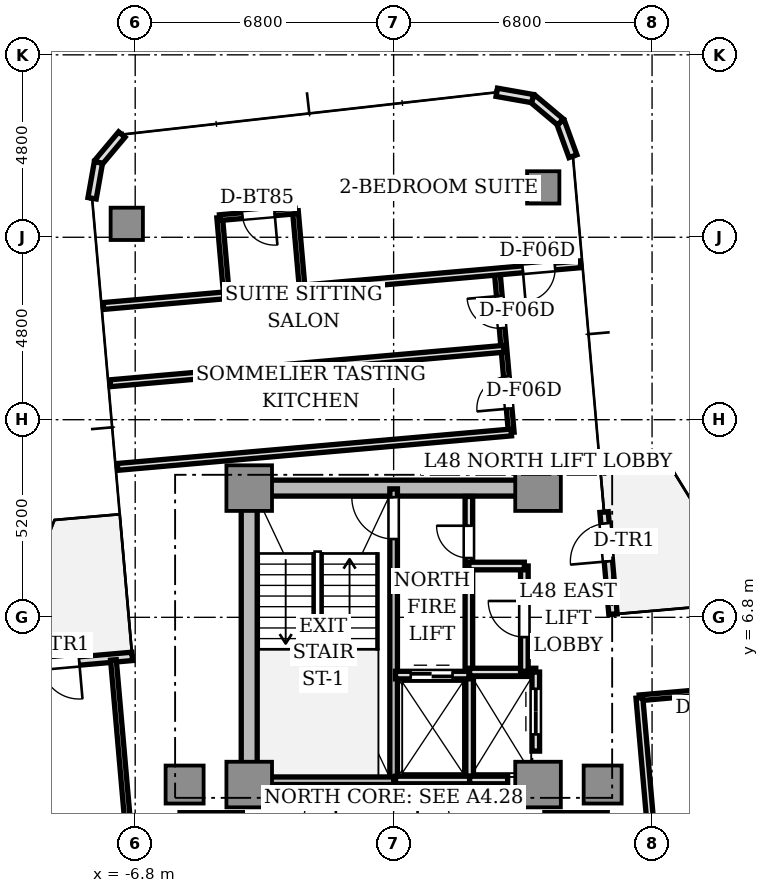
"""IFC4 building model, lengths in metres.
Left out: names, types, materials, properties, quantities, classifications, styles, units other than length and angle.
Written with IfcOpenShell. Run it as: python <this file> out.ifc"""

import sys

from ifc_helpers import new_model, si_unit, direction, frame, frame_2d, origin, origin_2d, place, context, subcontext, project, spatial, rectangle, extrude, source, transform, mapped, element, fill, save


model = new_model("IFC4")
c1 = context("Model", 3, precision=1e-05, world=origin(), true_north=direction((0.0, 1.0)))
c2 = subcontext(c1, "Body", "Model", "MODEL_VIEW")
j1 = project(units=[si_unit("LENGTHUNIT", "METRE"), si_unit("PLANEANGLEUNIT", "RADIAN")], contexts=[c1])
p1 = place(None, origin())
s1 = spatial("IfcSite", under=j1, at=p1, CompositionType="ELEMENT")
p2 = place(p1, origin())
s2 = spatial("IfcBuilding", under=s1, at=p2, CompositionType="ELEMENT")
p3 = place(p2, frame((0.0, 0.0, 175.2)))
s3 = spatial("IfcBuildingStorey", under=s2, at=p3, CompositionType="ELEMENT", Elevation=175.2)
p4 = place(p3, frame((-3.55, 10.2, 0.0), z_axis=(0.0, 0.0, 1.0), x_axis=(1.0, 0.0, 0.0)))
e1 = element("IfcWall", 1, at=p4, inside=s3, PredefinedType="SHEAR", context=c2, shape_type="SweptSolid", body=[
    extrude(rectangle(XDim=7.1, YDim=0.42, at=frame_2d((3.55, 0.0))), origin(), (0.0, 0.0, 1.0), 3.11),
])
p5 = place(p3, frame((-3.8, 2.85, 0.0), z_axis=(0.0, 0.0, 1.0), x_axis=(0.0, 1.0, 0.0)))
e2 = element("IfcWall", 2, at=p5, inside=s3, PredefinedType="SHEAR", context=c2, shape_type="SweptSolid", body=[
    extrude(rectangle(XDim=6.9, YDim=0.42, at=frame_2d((3.45, 0.0))), origin(), (0.0, 0.0, 1.0), 3.11),
])
m1 = source(origin(), c2, "Body", "SweptSolid", [
    extrude(rectangle(XDim=1.2, YDim=1.2, at=origin_2d()), origin(), (0.0, 0.0, 1.0), 3.11),
])
for number, where, z_axis, x_axis in (
    (3, (-3.8, 2.4, 0.0), (0.0, 0.0, 1.0), (1.0, 0.0, 0.0)),
    (4, (3.8, 2.4, 0.0), (0.0, 0.0, 1.0), (1.0, 0.0, 0.0)),
    (5, (-3.8, 10.2, 0.0), (0.0, 0.0, 1.0), (1.0, 0.0, 0.0)),
    (6, (3.8, 10.2, 0.0), (0.0, 0.0, 1.0), (1.0, 0.0, 0.0)),
):
    element("IfcColumn", number, at=place(p3, frame(where, z_axis=z_axis, x_axis=x_axis)), inside=s3, PredefinedType="COLUMN", context=c2, shape_type="MappedRepresentation", body=[
        mapped(m1, transform((0.0, 0.0, 0.0), scale=1.0)),
    ])
m2 = source(origin(), c2, "Body", "SweptSolid", [
    extrude(rectangle(XDim=1.0, YDim=1.0, at=origin_2d()), origin(), (0.0, 0.0, 1.0), 3.11),
])
for number, where, z_axis, x_axis in (
    (7, (5.5, 2.4, 0.0), (0.0, 0.0, 1.0), (1.0, 0.0, 0.0)),
    (8, (-5.5, 2.4, 0.0), (0.0, 0.0, 1.0), (1.0, 0.0, 0.0)),
):
    element("IfcColumn", number, at=place(p3, frame(where, z_axis=z_axis, x_axis=x_axis)), inside=s3, PredefinedType="COLUMN", context=c2, shape_type="MappedRepresentation", body=[
        mapped(m2, transform((0.0, 0.0, 0.0), scale=1.0)),
    ])
m3 = source(origin(), c2, "Body", "SweptSolid", [
    extrude(rectangle(XDim=0.85, YDim=0.85, at=origin_2d()), origin(), (0.0, 0.0, 1.0), 3.11),
])
for number, where, z_axis, x_axis in (
    (9, (3.936, 18.112, 0.0), (0.0, 0.0, 1.0), (1.0, 0.0, 0.0)),
    (10, (-7.022, 17.153, 0.0), (0.0, 0.0, 1.0), (1.0, 0.0, 0.0)),
):
    element("IfcColumn", number, at=place(p3, frame(where, z_axis=z_axis, x_axis=x_axis)), inside=s3, PredefinedType="COLUMN", context=c2, shape_type="MappedRepresentation", body=[
        mapped(m3, transform((0.0, 0.0, 0.0), scale=1.0)),
    ])
p6 = place(p3, frame((5.772, 6.879, 0.0), z_axis=(0.0, 0.0, 1.0), x_axis=(-0.087168071984, 0.996193619346, 0.0)))
e11 = element("IfcWall", 11, at=p6, inside=s3, PredefinedType="STANDARD", context=c2, shape_type="SweptSolid", body=[
    extrude(rectangle(XDim=2.7, YDim=0.22, at=frame_2d((1.35, 0.0))), origin(), (0.0, 0.0, 1.0), 3.11),
])
p7 = place(p6, frame((1.4, 0.0, 0.0)))
e12 = element("IfcOpeningElement", 12, at=p7, cuts=e11, PredefinedType="OPENING", context=c2, shape_type="SweptSolid", body=[
    extrude(rectangle(XDim=1.0, YDim=2.2, at=frame_2d((0.5, 1.1))), frame((0.0, 0.12, 0.0), z_axis=(0.0, -1.0, 0.0), x_axis=(1.0, 0.0, 0.0)), (0.0, 0.0, 1.0), 0.24),
])
p8 = place(p3, frame((4.718, 18.933, 0.0), z_axis=(0.0, 0.0, 1.0), x_axis=(-0.34188635151, 0.939741306239, 0.0)))
e13 = element("IfcWall", 13, at=p8, inside=s3, PredefinedType="STANDARD", context=c2, shape_type="SweptSolid", body=[
    extrude(rectangle(XDim=0.958, YDim=0.22, at=frame_2d((0.479, 0.0))), origin(), (0.0, 0.0, 1.0), 3.11),
])
for number, where, z_axis, x_axis in (
    (14, (4.39, 19.833, 0.0), (0.0, 0.0, 1.0), (-0.766, 0.643, 0.0)),
    (15, (3.657, 20.449, 0.0), (0.0, 0.0, 1.0), (-0.985, 0.174, 0.0)),
):
    element("IfcWall", number, at=place(p3, frame(where, z_axis=z_axis, x_axis=x_axis)), inside=s3, PredefinedType="STANDARD", context=c2, shape_type="SweptSolid", body=[
        extrude(rectangle(XDim=0.958, YDim=0.22, at=frame_2d((0.479, 0.0))), origin(), (0.0, 0.0, 1.0), 3.11),
    ])
for number, where, z_axis, x_axis in (
    (16, (-7.152, 19.503, 0.0), (0.0, 0.0, 1.0), (-0.643, -0.766, 0.0)),
    (17, (-7.768, 18.769, 0.0), (0.0, 0.0, 1.0), (-0.174, -0.985, 0.0)),
):
    element("IfcWall", number, at=place(p3, frame(where, z_axis=z_axis, x_axis=x_axis)), inside=s3, PredefinedType="STANDARD", context=c2, shape_type="SweptSolid", body=[
        extrude(rectangle(XDim=0.958, YDim=0.22, at=frame_2d((0.479, 0.0))), origin(), (0.0, 0.0, 1.0), 3.11),
    ])
p9 = place(p3, frame((-6.879, 5.772, 0.0), z_axis=(0.0, 0.0, 1.0), x_axis=(-0.996193619346, -0.087168071984, 0.0)))
e18 = element("IfcWall", 18, at=p9, inside=s3, PredefinedType="STANDARD", context=c2, shape_type="SweptSolid", body=[
    extrude(rectangle(XDim=2.7, YDim=0.22, at=frame_2d((1.35, 0.0))), origin(), (0.0, 0.0, 1.0), 3.11),
])
p10 = place(p9, frame((1.4, 0.0, 0.0)))
e19 = element("IfcOpeningElement", 19, at=p10, cuts=e18, PredefinedType="OPENING", context=c2, shape_type="SweptSolid", body=[
    extrude(rectangle(XDim=1.0, YDim=2.2, at=frame_2d((0.5, 1.1))), frame((0.0, 0.12, 0.0), z_axis=(0.0, -1.0, 0.0), x_axis=(1.0, 0.0, 0.0)), (0.0, 0.0, 1.0), 0.24),
])
p11 = place(p3, frame((0.0, 2.5, 0.0), z_axis=(0.0, 0.0, 1.0), x_axis=(0.0, 1.0, 0.0)))
e20 = element("IfcWall", 20, at=p11, inside=s3, PredefinedType="SOLIDWALL", context=c2, shape_type="SweptSolid", body=[
    extrude(rectangle(XDim=7.68, YDim=0.2, at=frame_2d((3.84, 0.0))), origin(), (0.0, 0.0, 1.0), 3.11),
])
p12 = place(p11, frame((6.36, 0.0, 0.0)))
e21 = element("IfcOpeningElement", 21, at=p12, cuts=e20, PredefinedType="OPENING", context=c2, shape_type="SweptSolid", body=[
    extrude(rectangle(XDim=1.1, YDim=2.15, at=frame_2d((0.55, 1.075))), frame((0.0, 0.11, 0.0), z_axis=(0.0, -1.0, 0.0), x_axis=(1.0, 0.0, 0.0)), (0.0, 0.0, 1.0), 0.22),
])
p13 = place(p3, frame((-3.72, 2.5, 0.0), z_axis=(0.0, 0.0, 1.0), x_axis=(1.0, 0.0, 0.0)))
e22 = element("IfcWall", 22, at=p13, inside=s3, PredefinedType="SOLIDWALL", context=c2, shape_type="SweptSolid", body=[
    extrude(rectangle(XDim=3.72, YDim=0.2, at=frame_2d((1.86, 0.0))), origin(), (0.0, 0.0, 1.0), 3.11),
])
p14 = place(p3, frame((1.98, 5.32, 0.0), z_axis=(0.0, 0.0, 1.0), x_axis=(0.0, 1.0, 0.0)))
e23 = element("IfcWall", 23, at=p14, inside=s3, PredefinedType="SOLIDWALL", context=c2, shape_type="SweptSolid", body=[
    extrude(rectangle(XDim=4.66, YDim=0.2, at=frame_2d((2.33, 0.0))), origin(), (0.0, 0.0, 1.0), 2.66),
])
p15 = place(p14, frame((3.04, 0.0, 0.0)))
e24 = element("IfcOpeningElement", 24, at=p15, cuts=e23, PredefinedType="OPENING", context=c2, shape_type="SweptSolid", body=[
    extrude(rectangle(XDim=0.85, YDim=2.1, at=frame_2d((0.425, 1.05))), frame((0.0, 0.11, 0.0), z_axis=(0.0, -1.0, 0.0), x_axis=(1.0, 0.0, 0.0)), (0.0, 0.0, 1.0), 0.22),
])
p16 = place(p3, frame((2.0, 2.5, 0.0), z_axis=(0.0, 0.0, 1.0), x_axis=(0.0, 1.0, 0.0)))
e25 = element("IfcWall", 25, at=p16, inside=s3, PredefinedType="SOLIDWALL", context=c2, shape_type="SweptSolid", body=[
    extrude(rectangle(XDim=2.78, YDim=0.2, at=frame_2d((1.39, 0.0))), origin(), (0.0, 0.0, 1.0), 2.66),
])
p17 = place(p3, frame((0.05, 2.52, 0.0), z_axis=(0.0, 0.0, 1.0), x_axis=(1.0, 0.0, 0.0)))
e26 = element("IfcWall", 26, at=p17, inside=s3, PredefinedType="SOLIDWALL", context=c2, shape_type="SweptSolid", body=[
    extrude(rectangle(XDim=1.95, YDim=0.2, at=frame_2d((0.975, 0.0))), origin(), (0.0, 0.0, 1.0), 2.66),
])
p18 = place(p3, frame((0.05, 5.28, 0.0), z_axis=(0.0, 0.0, 1.0), x_axis=(1.0, 0.0, 0.0)))
e27 = element("IfcWall", 27, at=p18, inside=s3, PredefinedType="SOLIDWALL", context=c2, shape_type="SweptSolid", body=[
    extrude(rectangle(XDim=1.93, YDim=0.2, at=frame_2d((0.965, 0.0))), origin(), (0.0, 0.0, 1.0), 2.66),
])
p19 = place(p18, frame((0.4, 0.0, 0.0)))
e28 = element("IfcOpeningElement", 28, at=p19, cuts=e27, PredefinedType="OPENING", context=c2, shape_type="SweptSolid", body=[
    extrude(rectangle(XDim=1.1, YDim=2.2, at=frame_2d((0.55, 1.1))), frame((0.0, 0.11, 0.0), z_axis=(0.0, -1.0, 0.0), x_axis=(1.0, 0.0, 0.0)), (0.0, 0.0, 1.0), 0.22),
])
p20 = place(p3, frame((2.0, 2.52, 0.0), z_axis=(0.0, 0.0, 1.0), x_axis=(1.0, 0.0, 0.0)))
e29 = element("IfcWall", 29, at=p20, inside=s3, PredefinedType="SOLIDWALL", context=c2, shape_type="SweptSolid", body=[
    extrude(rectangle(XDim=1.0, YDim=0.2, at=frame_2d((0.5, 0.0))), origin(), (0.0, 0.0, 1.0), 2.66),
])
p21 = place(p3, frame((2.0, 5.36, 0.0), z_axis=(0.0, 0.0, 1.0), x_axis=(1.0, 0.0, 0.0)))
e30 = element("IfcWall", 30, at=p21, inside=s3, PredefinedType="SOLIDWALL", context=c2, shape_type="SweptSolid", body=[
    extrude(rectangle(XDim=1.74, YDim=0.2, at=frame_2d((0.87, 0.0))), origin(), (0.0, 0.0, 1.0), 2.66),
])
p22 = place(p3, frame((3.74, 3.28, 0.0), z_axis=(0.0, 0.0, 1.0), x_axis=(0.0, 1.0, 0.0)))
e31 = element("IfcWall", 31, at=p22, inside=s3, PredefinedType="SOLIDWALL", context=c2, shape_type="SweptSolid", body=[
    extrude(rectangle(XDim=2.08, YDim=0.2, at=frame_2d((1.04, 0.0))), origin(), (0.0, 0.0, 1.0), 2.66),
])
p23 = place(p22, frame((0.44, 0.0, 0.0)))
e32 = element("IfcOpeningElement", 32, at=p23, cuts=e31, PredefinedType="OPENING", context=c2, shape_type="SweptSolid", body=[
    extrude(rectangle(XDim=1.2, YDim=2.2, at=frame_2d((0.6, 1.1))), frame((0.0, 0.11, 0.0), z_axis=(0.0, -1.0, 0.0), x_axis=(1.0, 0.0, 0.0)), (0.0, 0.0, 1.0), 0.22),
])
for number, where, z_axis, x_axis in (
    (33, (3.98, 1.56, 0.0), (0.0, 0.0, 1.0), (1.0, 0.0, 0.0)),
    (34, (-5.62, 1.56, 0.0), (0.0, 0.0, 1.0), (1.0, 0.0, 0.0)),
):
    element("IfcWall", number, at=place(p3, frame(where, z_axis=z_axis, x_axis=x_axis)), inside=s3, PredefinedType="SOLIDWALL", context=c2, shape_type="SweptSolid", body=[
        extrude(rectangle(XDim=1.64, YDim=0.2, at=frame_2d((0.82, 0.0))), origin(), (0.0, 0.0, 1.0), 2.66),
    ])
p24 = place(p3, frame((3.44, 5.38, 0.0), z_axis=(0.0, 0.0, 1.0), x_axis=(0.0, 1.0, 0.0)))
e35 = element("IfcWall", 35, at=p24, inside=s3, PredefinedType="SOLIDWALL", context=c2, shape_type="SweptSolid", body=[
    extrude(rectangle(XDim=2.77, YDim=0.2, at=frame_2d((1.385, 0.0))), origin(), (0.0, 0.0, 1.0), 2.66),
])
p25 = place(p24, frame((0.9, 0.0, 0.0)))
e36 = element("IfcOpeningElement", 36, at=p25, cuts=e35, PredefinedType="OPENING", context=c2, shape_type="SweptSolid", body=[
    extrude(rectangle(XDim=0.95, YDim=2.15, at=frame_2d((0.475, 1.075))), frame((0.0, 0.11, 0.0), z_axis=(0.0, -1.0, 0.0), x_axis=(1.0, 0.0, 0.0)), (0.0, 0.0, 1.0), 0.22),
])
p26 = place(p3, frame((1.98, 8.15, 0.0), z_axis=(0.0, 0.0, 1.0), x_axis=(1.0, 0.0, 0.0)))
e37 = element("IfcWall", 37, at=p26, inside=s3, PredefinedType="SOLIDWALL", context=c2, shape_type="SweptSolid", body=[
    extrude(rectangle(XDim=1.46, YDim=0.2, at=frame_2d((0.73, 0.0))), origin(), (0.0, 0.0, 1.0), 2.66),
])
p27 = place(p3, frame((6.467, 4.681, 0.0), z_axis=(0.0, 0.0, 1.0), x_axis=(0.996195452949, 0.087147114263, 0.0)))
e38 = element("IfcWall", 38, at=p27, inside=s3, PredefinedType="PARTITIONING", context=c2, shape_type="SweptSolid", body=[
    extrude(rectangle(XDim=8.55, YDim=0.15, at=frame_2d((4.275, 0.0))), origin(), (0.0, 0.0, 1.0), 2.66),
])
p28 = place(p27, frame((1.491, 0.0, 0.0)))
e39 = element("IfcOpeningElement", 39, at=p28, cuts=e38, PredefinedType="OPENING", context=c2, shape_type="SweptSolid", body=[
    extrude(rectangle(XDim=0.85, YDim=2.1, at=frame_2d((0.425, 1.05))), frame((0.0, 0.085, 0.0), z_axis=(0.0, -1.0, 0.0), x_axis=(1.0, 0.0, 0.0)), (0.0, 0.0, 1.0), 0.17),
])
p29 = place(p27, frame((4.792, 0.0, 0.0)))
e40 = element("IfcOpeningElement", 40, at=p29, cuts=e38, PredefinedType="OPENING", context=c2, shape_type="SweptSolid", body=[
    extrude(rectangle(XDim=0.85, YDim=2.1, at=frame_2d((0.425, 1.05))), frame((0.0, 0.085, 0.0), z_axis=(0.0, -1.0, 0.0), x_axis=(1.0, 0.0, 0.0)), (0.0, 0.0, 1.0), 0.17),
])
p30 = place(p3, frame((7.373, -5.679, 0.0), z_axis=(0.0, 0.0, 1.0), x_axis=(-0.087163455754, 0.996194023261, 0.0)))
e41 = element("IfcWall", 41, at=p30, inside=s3, PredefinedType="PARTITIONING", context=c2, shape_type="SweptSolid", body=[
    extrude(rectangle(XDim=10.4, YDim=0.18, at=frame_2d((5.2, 0.0))), origin(), (0.0, 0.0, 1.0), 2.66),
])
p31 = place(p3, frame((3.095, 11.664, 0.0), z_axis=(0.0, 0.0, 1.0), x_axis=(-0.087142722004, 0.996195837173, 0.0)))
e42 = element("IfcWall", 42, at=p31, inside=s3, PredefinedType="PARTITIONING", context=c2, shape_type="SweptSolid", body=[
    extrude(rectangle(XDim=4.25, YDim=0.15, at=frame_2d((2.125, 0.0))), origin(), (0.0, 0.0, 1.0), 2.66),
])
p32 = place(p31, frame((0.63, 0.0, 0.0)))
e43 = element("IfcOpeningElement", 43, at=p32, cuts=e42, PredefinedType="OPENING", context=c2, shape_type="SweptSolid", body=[
    extrude(rectangle(XDim=0.85, YDim=2.1, at=frame_2d((0.425, 1.05))), frame((0.0, 0.085, 0.0), z_axis=(0.0, -1.0, 0.0), x_axis=(1.0, 0.0, 0.0)), (0.0, 0.0, 1.0), 0.17),
])
p33 = place(p31, frame((2.755, 0.0, 0.0)))
e44 = element("IfcOpeningElement", 44, at=p33, cuts=e42, PredefinedType="OPENING", context=c2, shape_type="SweptSolid", body=[
    extrude(rectangle(XDim=0.85, YDim=2.1, at=frame_2d((0.425, 1.05))), frame((0.0, 0.085, 0.0), z_axis=(0.0, -1.0, 0.0), x_axis=(1.0, 0.0, 0.0)), (0.0, 0.0, 1.0), 0.17),
])
p34 = place(p3, frame((3.095, 11.664, 0.0), z_axis=(0.0, 0.0, 1.0), x_axis=(-0.996196061386, -0.087140158824, 0.0)))
e45 = element("IfcWall", 45, at=p34, inside=s3, PredefinedType="PARTITIONING", context=c2, shape_type="SweptSolid", body=[
    extrude(rectangle(XDim=10.4, YDim=0.18, at=frame_2d((5.2, 0.0))), origin(), (0.0, 0.0, 1.0), 2.66),
])
p35 = place(p3, frame((2.903, 13.866, 0.0), z_axis=(0.0, 0.0, 1.0), x_axis=(-0.996194201607, -0.087161417409, 0.0)))
e46 = element("IfcWall", 46, at=p35, inside=s3, PredefinedType="PARTITIONING", context=c2, shape_type="SweptSolid", body=[
    extrude(rectangle(XDim=10.4, YDim=0.18, at=frame_2d((5.2, 0.0))), origin(), (0.0, 0.0, 1.0), 2.66),
])
p36 = place(p3, frame((4.917, 16.09, 0.0), z_axis=(0.0, 0.0, 1.0), x_axis=(-0.996196619285, -0.087133780622, 0.0)))
e47 = element("IfcWall", 47, at=p36, inside=s3, PredefinedType="PARTITIONING", context=c2, shape_type="SweptSolid", body=[
    extrude(rectangle(XDim=12.6, YDim=0.18, at=frame_2d((6.3, 0.0))), origin(), (0.0, 0.0, 1.0), 2.66),
])
p37 = place(p36, frame((0.675, 0.0, 0.0)))
e48 = element("IfcOpeningElement", 48, at=p37, cuts=e47, PredefinedType="OPENING", context=c2, shape_type="SweptSolid", body=[
    extrude(rectangle(XDim=0.85, YDim=2.1, at=frame_2d((0.425, 1.05))), frame((0.0, 0.1, 0.0), z_axis=(0.0, -1.0, 0.0), x_axis=(1.0, 0.0, 0.0)), (0.0, 0.0, 1.0), 0.2),
])
for number, where, z_axis, x_axis in (
    (49, (-4.398, 15.275, 0.0), (0.0, 0.0, 1.0), (-0.087, 0.996, 0.0)),
    (50, (-2.406, 15.449, 0.0), (0.0, 0.0, 1.0), (-0.087, 0.996, 0.0)),
):
    element("IfcWall", number, at=place(p3, frame(where, z_axis=z_axis, x_axis=x_axis)), inside=s3, PredefinedType="PARTITIONING", context=c2, shape_type="SweptSolid", body=[
        extrude(rectangle(XDim=2.05, YDim=0.15, at=frame_2d((1.025, 0.0))), origin(), (0.0, 0.0, 1.0), 2.66),
    ])
p38 = place(p3, frame((-2.584, 17.491, 0.0), z_axis=(0.0, 0.0, 1.0), x_axis=(-0.99619464492, -0.087156350505, 0.0)))
e51 = element("IfcWall", 51, at=p38, inside=s3, PredefinedType="PARTITIONING", context=c2, shape_type="SweptSolid", body=[
    extrude(rectangle(XDim=2.0, YDim=0.15, at=frame_2d((1.0, 0.0))), origin(), (0.0, 0.0, 1.0), 2.63),
])
p39 = place(p38, frame((0.55, 0.0, 0.0)))
e52 = element("IfcOpeningElement", 52, at=p39, cuts=e51, PredefinedType="OPENING", context=c2, shape_type="SweptSolid", body=[
    extrude(rectangle(XDim=0.85, YDim=2.1, at=frame_2d((0.425, 1.05))), frame((0.0, 0.085, 0.0), z_axis=(0.0, -1.0, 0.0), x_axis=(1.0, 0.0, 0.0)), (0.0, 0.0, 1.0), 0.17),
])
p40 = place(p3, frame((-7.373, 5.679, 0.0), z_axis=(0.0, 0.0, 1.0), x_axis=(0.087154691724, -0.996194790044, 0.0)))
e53 = element("IfcWall", 53, at=p40, inside=s3, PredefinedType="PARTITIONING", context=c2, shape_type="SweptSolid", body=[
    extrude(rectangle(XDim=12.6, YDim=0.15, at=frame_2d((6.3, 0.0))), origin(), (0.0, 0.0, 1.0), 2.66),
])
p41 = place(p40, frame((5.5, 0.0, 0.0)))
e54 = element("IfcOpeningElement", 54, at=p41, cuts=e53, PredefinedType="OPENING", context=c2, shape_type="SweptSolid", body=[
    extrude(rectangle(XDim=1.6, YDim=2.25, at=frame_2d((0.8, 1.125))), frame((0.0, 0.085, 0.0), z_axis=(0.0, -1.0, 0.0), x_axis=(1.0, 0.0, 0.0)), (0.0, 0.0, 1.0), 0.17),
])
m4 = source(origin(), c2, "Body", "SweptSolid", [
    extrude(rectangle(XDim=1.0, YDim=0.05, at=origin_2d()), origin(), (0.0, 0.0, 1.0), 2.2),
])
p42 = place(p7, frame((0.5, 0.0, 0.0)))
e55 = element("IfcDoor", 55, at=p42, inside=s3, OperationType="SINGLE_SWING_LEFT", PredefinedType="DOOR", context=c2, shape_type="MappedRepresentation", body=[
    mapped(m4, transform((0.0, 0.0, 0.0), scale=1.0)),
])
fill(e12, e55)
p43 = place(p10, frame((0.5, 0.0, 0.0)))
e56 = element("IfcDoor", 56, at=p43, inside=s3, OperationType="SINGLE_SWING_LEFT", PredefinedType="DOOR", context=c2, shape_type="MappedRepresentation", body=[
    mapped(m4, transform((0.0, 0.0, 0.0), scale=1.0)),
])
fill(e19, e56)
m5 = source(origin(), c2, "Body", "SweptSolid", [
    extrude(rectangle(XDim=1.1, YDim=0.05, at=origin_2d()), origin(), (0.0, 0.0, 1.0), 2.15),
])
p44 = place(p12, frame((0.55, 0.0, 0.0)))
e57 = element("IfcDoor", 57, at=p44, inside=s3, OperationType="SINGLE_SWING_RIGHT", PredefinedType="DOOR", context=c2, shape_type="MappedRepresentation", body=[
    mapped(m5, transform((0.0, 0.0, 0.0), scale=1.0)),
])
fill(e21, e57)
m6 = source(origin(), c2, "Body", "SweptSolid", [
    extrude(rectangle(XDim=0.85, YDim=0.05, at=origin_2d()), origin(), (0.0, 0.0, 1.0), 2.1),
])
p45 = place(p15, frame((0.425, 0.0, 0.0)))
e58 = element("IfcDoor", 58, at=p45, inside=s3, OperationType="SINGLE_SWING_RIGHT", PredefinedType="DOOR", context=c2, shape_type="MappedRepresentation", body=[
    mapped(m6, transform((0.0, 0.0, 0.0), scale=1.0)),
])
fill(e24, e58)
m7 = source(origin(), c2, "Body", "SweptSolid", [
    extrude(rectangle(XDim=1.1, YDim=0.05, at=origin_2d()), origin(), (0.0, 0.0, 1.0), 2.2),
])
p46 = place(p19, frame((0.55, 0.0, 0.0)))
e59 = element("IfcDoor", 59, at=p46, inside=s3, OperationType="DOUBLE_DOOR_SLIDING", PredefinedType="DOOR", context=c2, shape_type="MappedRepresentation", body=[
    mapped(m7, transform((0.0, 0.0, 0.0), scale=1.0)),
])
fill(e28, e59)
m8 = source(origin(), c2, "Body", "SweptSolid", [
    extrude(rectangle(XDim=1.2, YDim=0.05, at=origin_2d()), origin(), (0.0, 0.0, 1.0), 2.2),
])
p47 = place(p23, frame((0.6, 0.0, 0.0)))
e60 = element("IfcDoor", 60, at=p47, inside=s3, OperationType="DOUBLE_DOOR_SLIDING", PredefinedType="DOOR", context=c2, shape_type="MappedRepresentation", body=[
    mapped(m8, transform((0.0, 0.0, 0.0), scale=1.0)),
])
fill(e32, e60)
m9 = source(origin(), c2, "Body", "SweptSolid", [
    extrude(rectangle(XDim=0.95, YDim=0.05, at=origin_2d()), origin(), (0.0, 0.0, 1.0), 2.15),
])
p48 = place(p25, frame((0.475, 0.0, 0.0)))
e61 = element("IfcDoor", 61, at=p48, inside=s3, OperationType="SINGLE_SWING_RIGHT", PredefinedType="DOOR", context=c2, shape_type="MappedRepresentation", body=[
    mapped(m9, transform((0.0, 0.0, 0.0), scale=1.0)),
])
fill(e36, e61)
p49 = place(p32, frame((0.425, 0.0, 0.0)))
e62 = element("IfcDoor", 62, at=p49, inside=s3, OperationType="SINGLE_SWING_LEFT", PredefinedType="DOOR", context=c2, shape_type="MappedRepresentation", body=[
    mapped(m6, transform((0.0, 0.0, 0.0), scale=1.0)),
])
fill(e43, e62)
p50 = place(p33, frame((0.425, 0.0, 0.0)))
e63 = element("IfcDoor", 63, at=p50, inside=s3, OperationType="SINGLE_SWING_RIGHT", PredefinedType="DOOR", context=c2, shape_type="MappedRepresentation", body=[
    mapped(m6, transform((0.0, 0.0, 0.0), scale=1.0)),
])
fill(e44, e63)
p51 = place(p39, frame((0.425, 0.0, 0.0)))
e64 = element("IfcDoor", 64, at=p51, inside=s3, OperationType="SINGLE_SWING_LEFT", PredefinedType="DOOR", context=c2, shape_type="MappedRepresentation", body=[
    mapped(m6, transform((0.0, 0.0, 0.0), scale=1.0)),
])
fill(e52, e64)
p52 = place(p37, frame((0.425, 0.0, 0.0)))
e65 = element("IfcDoor", 65, at=p52, inside=s3, OperationType="SINGLE_SWING_RIGHT", PredefinedType="DOOR", context=c2, shape_type="MappedRepresentation", body=[
    mapped(m6, transform((0.0, 0.0, 0.0), scale=1.0)),
])
fill(e48, e65)
save(model, sys.argv[1])
